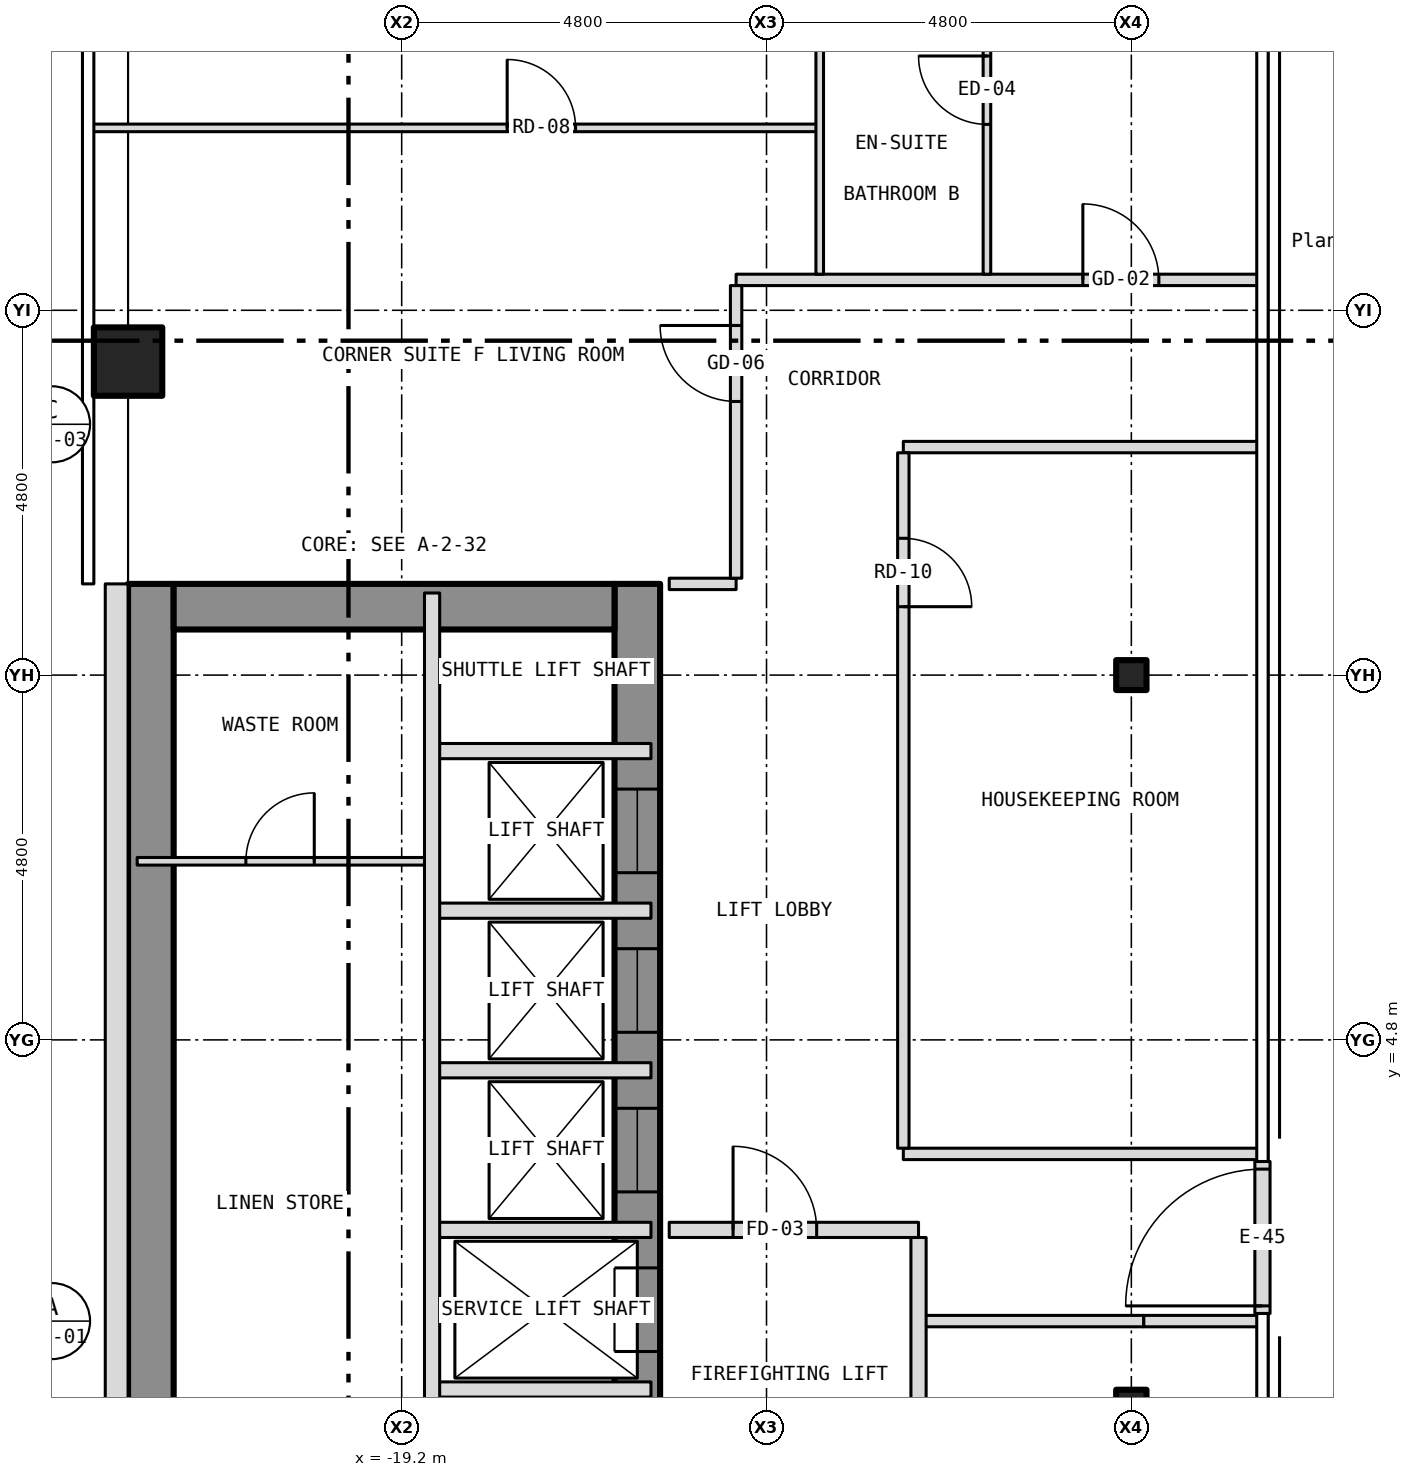
"""IFC4 building model, lengths in metres.
Left out: names, types, materials, properties, quantities, classifications, styles, units other than length and angle.
Written with IfcOpenShell. Run it as: python <this file> out.ifc"""

import sys

from ifc_helpers import new_model, si_unit, direction, frame, frame_2d, origin, origin_2d, place, context, subcontext, project, spatial, rectangle, hollow_rectangle, i_section, extrude, element, fill, save


model = new_model("IFC4")
c1 = context("Model", 3, precision=1e-05, world=origin(), true_north=direction((0.0, 1.0)))
c2 = subcontext(c1, "Body", "Model", "MODEL_VIEW")
j1 = project(units=[si_unit("LENGTHUNIT", "METRE"), si_unit("PLANEANGLEUNIT", "RADIAN")], contexts=[c1])
p1 = place(None, origin())
s1 = spatial("IfcSite", under=j1, at=p1, CompositionType="ELEMENT")
p2 = place(p1, origin())
s2 = spatial("IfcBuilding", under=s1, at=p2, CompositionType="ELEMENT")
p3 = place(p2, frame((0.0, 0.0, 117.0)))
s3 = spatial("IfcBuildingStorey", under=s2, at=p3, CompositionType="ELEMENT", Elevation=117.0)
p4 = place(p3, frame((-22.8, 13.725, -0.15), z_axis=(0.0, 0.0, 1.0), x_axis=(1.0, 0.0, 0.0)))
e1 = element("IfcColumn", 1, at=p4, inside=s3, PredefinedType="COLUMN", context=c2, shape_type="SweptSolid", body=[
    extrude(hollow_rectangle(XDim=0.9, YDim=0.9, WallThickness=0.05, at=origin_2d()), origin(), (0.0, 0.0, 1.0), 3.5),
])
for number, where, z_axis, x_axis in (
    (2, (-9.6, 0.0, -0.15), (0.0, 0.0, 1.0), (1.0, 0.0, 0.0)),
    (3, (-9.6, 9.6, -0.15), (0.0, 0.0, 1.0), (1.0, 0.0, 0.0)),
):
    element("IfcColumn", number, at=place(p3, frame(where, z_axis=z_axis, x_axis=x_axis)), inside=s3, PredefinedType="COLUMN", context=c2, shape_type="SweptSolid", body=[
        extrude(i_section(OverallWidth=0.399, OverallDepth=0.394, WebThickness=0.023, FlangeThickness=0.037, at=origin_2d()), origin(), (0.0, 0.0, 1.0), 3.5),
    ])
p5 = place(p3, frame((-16.1, -10.8, 0.0), z_axis=(0.0, 0.0, 1.0), x_axis=(0.0, 1.0, 0.0)))
e4 = element("IfcWall", 4, at=p5, inside=s3, PredefinedType="SHEAR", context=c2, shape_type="SweptSolid", body=[
    extrude(rectangle(XDim=21.6, YDim=0.6, at=frame_2d((10.8, 0.0))), origin(), (0.0, 0.0, 1.0), 3.25),
])
p6 = place(p5, frame((9.4, 0.0, 0.0)))
e5 = element("IfcOpeningElement", 5, at=p6, cuts=e4, PredefinedType="OPENING", context=c2, shape_type="SweptSolid", body=[
    extrude(rectangle(XDim=1.1, YDim=2.1, at=frame_2d((0.55, 1.05))), frame((0.0, 0.312, 0.0), z_axis=(0.0, -1.0, 0.0), x_axis=(1.0, 0.0, 0.0)), (0.0, 0.0, 1.0), 0.624),
])
p7 = place(p5, frame((11.5, 0.0, 0.0)))
e6 = element("IfcOpeningElement", 6, at=p7, cuts=e4, PredefinedType="OPENING", context=c2, shape_type="SweptSolid", body=[
    extrude(rectangle(XDim=1.1, YDim=2.1, at=frame_2d((0.55, 1.05))), frame((0.0, 0.312, 0.0), z_axis=(0.0, -1.0, 0.0), x_axis=(1.0, 0.0, 0.0)), (0.0, 0.0, 1.0), 0.624),
])
p8 = place(p5, frame((13.6, 0.0, 0.0)))
e7 = element("IfcOpeningElement", 7, at=p8, cuts=e4, PredefinedType="OPENING", context=c2, shape_type="SweptSolid", body=[
    extrude(rectangle(XDim=1.1, YDim=2.1, at=frame_2d((0.55, 1.05))), frame((0.0, 0.312, 0.0), z_axis=(0.0, -1.0, 0.0), x_axis=(1.0, 0.0, 0.0)), (0.0, 0.0, 1.0), 0.624),
])
p9 = place(p5, frame((15.7, 0.0, 0.0)))
e8 = element("IfcOpeningElement", 8, at=p9, cuts=e4, PredefinedType="OPENING", context=c2, shape_type="SweptSolid", body=[
    extrude(rectangle(XDim=1.1, YDim=2.1, at=frame_2d((0.55, 1.05))), frame((0.0, 0.312, 0.0), z_axis=(0.0, -1.0, 0.0), x_axis=(1.0, 0.0, 0.0)), (0.0, 0.0, 1.0), 0.624),
])
p10 = place(p5, frame((17.8, 0.0, 0.0)))
e9 = element("IfcOpeningElement", 9, at=p10, cuts=e4, PredefinedType="OPENING", context=c2, shape_type="SweptSolid", body=[
    extrude(rectangle(XDim=1.1, YDim=2.1, at=frame_2d((0.55, 1.05))), frame((0.0, 0.312, 0.0), z_axis=(0.0, -1.0, 0.0), x_axis=(1.0, 0.0, 0.0)), (0.0, 0.0, 1.0), 0.624),
])
p11 = place(p5, frame((0.758, 0.0, 0.0)))
e10 = element("IfcOpeningElement", 10, at=p11, cuts=e4, PredefinedType="OPENING", context=c2, shape_type="SweptSolid", body=[
    extrude(rectangle(XDim=1.1, YDim=2.1, at=frame_2d((0.55, 1.05))), frame((0.0, 0.312, 0.0), z_axis=(0.0, -1.0, 0.0), x_axis=(1.0, 0.0, 0.0)), (0.0, 0.0, 1.0), 0.624),
])
p12 = place(p5, frame((7.5, 0.0, 0.0)))
e11 = element("IfcOpeningElement", 11, at=p12, cuts=e4, PredefinedType="OPENING", context=c2, shape_type="SweptSolid", body=[
    extrude(rectangle(XDim=1.1, YDim=2.1, at=frame_2d((0.55, 1.05))), frame((0.0, 0.312, 0.0), z_axis=(0.0, -1.0, 0.0), x_axis=(1.0, 0.0, 0.0)), (0.0, 0.0, 1.0), 0.624),
])
p13 = place(p3, frame((-22.5, -10.8, 0.0), z_axis=(0.0, 0.0, 1.0), x_axis=(0.0, 1.0, 0.0)))
e12 = element("IfcWall", 12, at=p13, inside=s3, PredefinedType="SHEAR", context=c2, shape_type="SweptSolid", body=[
    extrude(rectangle(XDim=21.6, YDim=0.6, at=frame_2d((10.8, 0.0))), origin(), (0.0, 0.0, 1.0), 3.25),
])
p14 = place(p3, frame((-22.2, 10.5, 0.0), z_axis=(0.0, 0.0, 1.0), x_axis=(1.0, 0.0, 0.0)))
e13 = element("IfcWall", 13, at=p14, inside=s3, PredefinedType="SHEAR", context=c2, shape_type="SweptSolid", body=[
    extrude(rectangle(XDim=5.8, YDim=0.6, at=frame_2d((2.9, 0.0))), origin(), (0.0, 0.0, 1.0), 3.25),
])
p15 = place(p3, frame((-22.95, 10.8, 0.0), z_axis=(0.0, 0.0, 1.0), x_axis=(0.0, -1.0, 0.0)))
e14 = element("IfcWall", 14, at=p15, inside=s3, PredefinedType="SOLIDWALL", context=c2, shape_type="SweptSolid", body=[
    extrude(rectangle(XDim=21.6, YDim=0.3, at=frame_2d((10.8, 0.0))), origin(), (0.0, 0.0, 1.0), 3.5),
])
p16 = place(p15, frame((18.05, 0.0, 1.0)))
e15 = element("IfcOpeningElement", 15, at=p16, cuts=e14, PredefinedType="OPENING", context=c2, shape_type="SweptSolid", body=[
    extrude(rectangle(XDim=0.6, YDim=1.5, at=frame_2d((0.3, 0.75))), frame((0.0, 0.162, 0.0), z_axis=(0.0, -1.0, 0.0), x_axis=(1.0, 0.0, 0.0)), (0.0, 0.0, 1.0), 0.324),
])
p17 = place(p3, frame((-7.875, 1.2, 0.0), z_axis=(0.0, 0.0, 1.0), x_axis=(0.0, 1.0, 0.0)))
e16 = element("IfcWall", 16, at=p17, inside=s3, PredefinedType="SOLIDWALL", context=c2, shape_type="SweptSolid", body=[
    extrude(rectangle(XDim=2.0, YDim=0.2, at=frame_2d((1.0, 0.0))), origin(), (0.0, 0.0, 1.0), 2.593),
])
p18 = place(p17, frame((0.1, 0.0, 0.0)))
e17 = element("IfcOpeningElement", 17, at=p18, cuts=e16, PredefinedType="OPENING", context=c2, shape_type="SweptSolid", body=[
    extrude(rectangle(XDim=1.8, YDim=2.1, at=frame_2d((0.9, 1.05))), frame((0.0, 0.112, 0.0), z_axis=(0.0, -1.0, 0.0), x_axis=(1.0, 0.0, 0.0)), (0.0, 0.0, 1.0), 0.224),
])
p19 = place(p3, frame((-18.8, 0.2, 0.0), z_axis=(0.0, 0.0, 1.0), x_axis=(1.0, 0.0, 0.0)))
e18 = element("IfcWall", 18, at=p19, inside=s3, PredefinedType="PARTITIONING", context=c2, shape_type="SweptSolid", body=[
    extrude(rectangle(XDim=2.88, YDim=0.2, at=frame_2d((1.44, 0.0))), origin(), (0.0, 0.0, 1.0), 3.25),
])
p20 = place(p3, frame((-12.4, 1.1, 0.0), z_axis=(0.0, 0.0, 1.0), x_axis=(1.0, 0.0, 0.0)))
e19 = element("IfcWall", 19, at=p20, inside=s3, PredefinedType="PARTITIONING", context=c2, shape_type="SweptSolid", body=[
    extrude(rectangle(XDim=2.964, YDim=0.15, at=frame_2d((1.482, 0.0))), origin(), (0.0, 0.0, 1.0), 3.35),
])
p21 = place(p3, frame((-9.436, 1.1, 0.0), z_axis=(0.0, 0.0, 1.0), x_axis=(1.0, 0.0, 0.0)))
e20 = element("IfcWall", 20, at=p21, inside=s3, PredefinedType="PARTITIONING", context=c2, shape_type="SweptSolid", body=[
    extrude(rectangle(XDim=1.516, YDim=0.15, at=frame_2d((0.758, 0.0))), origin(), (0.0, 0.0, 1.0), 2.593),
])
p22 = place(p3, frame((-18.8, 2.3, 0.0), z_axis=(0.0, 0.0, 1.0), x_axis=(1.0, 0.0, 0.0)))
e21 = element("IfcWall", 21, at=p22, inside=s3, PredefinedType="PARTITIONING", context=c2, shape_type="SweptSolid", body=[
    extrude(rectangle(XDim=2.88, YDim=0.2, at=frame_2d((1.44, 0.0))), origin(), (0.0, 0.0, 1.0), 3.25),
])
p23 = place(p3, frame((-15.68, 2.3, 0.0), z_axis=(0.0, 0.0, 1.0), x_axis=(1.0, 0.0, 0.0)))
e22 = element("IfcWall", 22, at=p23, inside=s3, PredefinedType="PARTITIONING", context=c2, shape_type="SweptSolid", body=[
    extrude(rectangle(XDim=3.28, YDim=0.2, at=frame_2d((1.64, 0.0))), origin(), (0.0, 0.0, 1.0), 3.35),
])
p24 = place(p23, frame((0.84, 0.0, 0.0)))
e23 = element("IfcOpeningElement", 23, at=p24, cuts=e22, PredefinedType="OPENING", context=c2, shape_type="SweptSolid", body=[
    extrude(rectangle(XDim=1.1, YDim=2.1, at=frame_2d((0.55, 1.05))), frame((0.0, 0.112, 0.0), z_axis=(0.0, -1.0, 0.0), x_axis=(1.0, 0.0, 0.0)), (0.0, 0.0, 1.0), 0.224),
])
p25 = place(p3, frame((-12.6, 3.3, 0.0), z_axis=(0.0, 0.0, 1.0), x_axis=(1.0, 0.0, 0.0)))
e24 = element("IfcWall", 24, at=p25, inside=s3, PredefinedType="PARTITIONING", context=c2, shape_type="SweptSolid", body=[
    extrude(rectangle(XDim=4.68, YDim=0.15, at=frame_2d((2.34, 0.0))), origin(), (0.0, 0.0, 1.0), 3.35),
])
for number, where, z_axis, x_axis in (
    (25, (-18.8, 4.4, 0.0), (0.0, 0.0, 1.0), (1.0, 0.0, 0.0)),
    (26, (-18.8, 6.5, 0.0), (0.0, 0.0, 1.0), (1.0, 0.0, 0.0)),
):
    element("IfcWall", number, at=place(p3, frame(where, z_axis=z_axis, x_axis=x_axis)), inside=s3, PredefinedType="PARTITIONING", context=c2, shape_type="SweptSolid", body=[
        extrude(rectangle(XDim=2.88, YDim=0.2, at=frame_2d((1.44, 0.0))), origin(), (0.0, 0.0, 1.0), 3.25),
    ])
p26 = place(p3, frame((-22.68, 7.15, 0.0), z_axis=(0.0, 0.0, 1.0), x_axis=(1.0, 0.0, 0.0)))
e27 = element("IfcWall", 27, at=p26, inside=s3, PredefinedType="PARTITIONING", context=c2, shape_type="SweptSolid", body=[
    extrude(rectangle(XDim=3.88, YDim=0.1, at=frame_2d((1.94, 0.0))), origin(), (0.0, 0.0, 1.0), 3.25),
])
p27 = place(p26, frame((1.43, 0.0, 0.0)))
e28 = element("IfcOpeningElement", 28, at=p27, cuts=e27, PredefinedType="OPENING", context=c2, shape_type="SweptSolid", body=[
    extrude(rectangle(XDim=0.9, YDim=2.1, at=frame_2d((0.45, 1.05))), frame((0.0, 0.062, 0.0), z_axis=(0.0, -1.0, 0.0), x_axis=(1.0, 0.0, 0.0)), (0.0, 0.0, 1.0), 0.124),
])
p28 = place(p3, frame((-18.8, 8.6, 0.0), z_axis=(0.0, 0.0, 1.0), x_axis=(1.0, 0.0, 0.0)))
e29 = element("IfcWall", 29, at=p28, inside=s3, PredefinedType="PARTITIONING", context=c2, shape_type="SweptSolid", body=[
    extrude(rectangle(XDim=2.88, YDim=0.2, at=frame_2d((1.44, 0.0))), origin(), (0.0, 0.0, 1.0), 3.25),
])
p29 = place(p3, frame((-15.68, 10.8, 0.0), z_axis=(0.0, 0.0, 1.0), x_axis=(1.0, 0.0, 0.0)))
e30 = element("IfcWall", 30, at=p29, inside=s3, PredefinedType="PARTITIONING", context=c2, shape_type="SweptSolid", body=[
    extrude(rectangle(XDim=0.88, YDim=0.15, at=frame_2d((0.44, 0.0))), origin(), (0.0, 0.0, 1.0), 3.35),
])
p30 = place(p3, frame((-12.6, 12.6, 0.0), z_axis=(0.0, 0.0, 1.0), x_axis=(1.0, 0.0, 0.0)))
e31 = element("IfcWall", 31, at=p30, inside=s3, PredefinedType="PARTITIONING", context=c2, shape_type="SweptSolid", body=[
    extrude(rectangle(XDim=4.68, YDim=0.15, at=frame_2d((2.34, 0.0))), origin(), (0.0, 0.0, 1.0), 3.35),
])
p31 = place(p3, frame((-14.8, 14.8, 0.0), z_axis=(0.0, 0.0, 1.0), x_axis=(1.0, 0.0, 0.0)))
e32 = element("IfcWall", 32, at=p31, inside=s3, PredefinedType="PARTITIONING", context=c2, shape_type="SweptSolid", body=[
    extrude(rectangle(XDim=6.88, YDim=0.15, at=frame_2d((3.44, 0.0))), origin(), (0.0, 0.0, 1.0), 3.35),
])
p32 = place(p31, frame((4.562, 0.0, 0.0)))
e33 = element("IfcOpeningElement", 33, at=p32, cuts=e32, PredefinedType="OPENING", context=c2, shape_type="SweptSolid", body=[
    extrude(rectangle(XDim=1.0, YDim=2.1, at=frame_2d((0.5, 1.05))), frame((0.0, 0.087, 0.0), z_axis=(0.0, -1.0, 0.0), x_axis=(1.0, 0.0, 0.0)), (0.0, 0.0, 1.0), 0.174),
])
p33 = place(p3, frame((-23.28, 16.8, 0.0), z_axis=(0.0, 0.0, 1.0), x_axis=(1.0, 0.0, 0.0)))
e34 = element("IfcWall", 34, at=p33, inside=s3, PredefinedType="PARTITIONING", context=c2, shape_type="SweptSolid", body=[
    extrude(rectangle(XDim=9.58, YDim=0.1, at=frame_2d((4.79, 0.0))), origin(), (0.0, 0.0, 1.0), 3.35),
])
p34 = place(p33, frame((5.468, 0.0, 0.0)))
e35 = element("IfcOpeningElement", 35, at=p34, cuts=e34, PredefinedType="OPENING", context=c2, shape_type="SweptSolid", body=[
    extrude(rectangle(XDim=0.9, YDim=2.1, at=frame_2d((0.45, 1.05))), frame((0.0, 0.062, 0.0), z_axis=(0.0, -1.0, 0.0), x_axis=(1.0, 0.0, 0.0)), (0.0, 0.0, 1.0), 0.124),
])
p35 = place(p3, frame((-18.8, -1.8, 0.0), z_axis=(0.0, 0.0, 1.0), x_axis=(0.0, 1.0, 0.0)))
e36 = element("IfcWall", 36, at=p35, inside=s3, PredefinedType="PARTITIONING", context=c2, shape_type="SweptSolid", body=[
    extrude(rectangle(XDim=12.48, YDim=0.2, at=frame_2d((6.24, 0.0))), origin(), (0.0, 0.0, 1.0), 3.25),
])
p36 = place(p3, frame((-14.8, 10.875, 0.0), z_axis=(0.0, 0.0, 1.0), x_axis=(0.0, 1.0, 0.0)))
e37 = element("IfcWall", 37, at=p36, inside=s3, PredefinedType="PARTITIONING", context=c2, shape_type="SweptSolid", body=[
    extrude(rectangle(XDim=3.85, YDim=0.15, at=frame_2d((1.925, 0.0))), origin(), (0.0, 0.0, 1.0), 3.35),
])
p37 = place(p36, frame((2.325, 0.0, 0.0)))
e38 = element("IfcOpeningElement", 38, at=p37, cuts=e37, PredefinedType="OPENING", context=c2, shape_type="SweptSolid", body=[
    extrude(rectangle(XDim=1.0, YDim=2.1, at=frame_2d((0.5, 1.05))), frame((0.0, 0.087, 0.0), z_axis=(0.0, -1.0, 0.0), x_axis=(1.0, 0.0, 0.0)), (0.0, 0.0, 1.0), 0.174),
])
p38 = place(p3, frame((-13.7, 14.875, 0.0), z_axis=(0.0, 0.0, 1.0), x_axis=(0.0, 1.0, 0.0)))
e39 = element("IfcWall", 39, at=p38, inside=s3, PredefinedType="PARTITIONING", context=c2, shape_type="SweptSolid", body=[
    extrude(rectangle(XDim=7.805, YDim=0.1, at=frame_2d((3.902, 0.0))), origin(), (0.0, 0.0, 1.0), 3.35),
])
p39 = place(p3, frame((-12.6, 3.375, 0.0), z_axis=(0.0, 0.0, 1.0), x_axis=(0.0, 1.0, 0.0)))
e40 = element("IfcWall", 40, at=p39, inside=s3, PredefinedType="PARTITIONING", context=c2, shape_type="SweptSolid", body=[
    extrude(rectangle(XDim=9.15, YDim=0.15, at=frame_2d((4.575, 0.0))), origin(), (0.0, 0.0, 1.0), 3.35),
])
p40 = place(p39, frame((7.125, 0.0, 0.0)))
e41 = element("IfcOpeningElement", 41, at=p40, cuts=e40, PredefinedType="OPENING", context=c2, shape_type="SweptSolid", body=[
    extrude(rectangle(XDim=0.9, YDim=2.1, at=frame_2d((0.45, 1.05))), frame((0.0, 0.087, 0.0), z_axis=(0.0, -1.0, 0.0), x_axis=(1.0, 0.0, 0.0)), (0.0, 0.0, 1.0), 0.174),
])
p41 = place(p3, frame((-12.4, -1.8, 0.0), z_axis=(0.0, 0.0, 1.0), x_axis=(0.0, 1.0, 0.0)))
e42 = element("IfcWall", 42, at=p41, inside=s3, PredefinedType="PARTITIONING", context=c2, shape_type="SweptSolid", body=[
    extrude(rectangle(XDim=4.0, YDim=0.2, at=frame_2d((2.0, 0.0))), origin(), (0.0, 0.0, 1.0), 3.35),
])
p42 = place(p3, frame((-11.5, 14.875, 0.0), z_axis=(0.0, 0.0, 1.0), x_axis=(0.0, 1.0, 0.0)))
e43 = element("IfcWall", 43, at=p42, inside=s3, PredefinedType="PARTITIONING", context=c2, shape_type="SweptSolid", body=[
    extrude(rectangle(XDim=3.075, YDim=0.1, at=frame_2d((1.538, 0.0))), origin(), (0.0, 0.0, 1.0), 3.35),
])
p43 = place(p42, frame((1.971, 0.0, 0.0)))
e44 = element("IfcOpeningElement", 44, at=p43, cuts=e43, PredefinedType="OPENING", context=c2, shape_type="SweptSolid", body=[
    extrude(rectangle(XDim=0.9, YDim=2.1, at=frame_2d((0.45, 1.05))), frame((0.0, 0.062, 0.0), z_axis=(0.0, -1.0, 0.0), x_axis=(1.0, 0.0, 0.0)), (0.0, 0.0, 1.0), 0.124),
])
p44 = place(p18, origin())
e45 = element("IfcDoor", 45, at=p44, inside=s3, OperationType="DOUBLE_DOOR_DOUBLE_SWING", PredefinedType="DOOR", context=c2, shape_type="SweptSolid", body=[
    extrude(rectangle(XDim=1.8, YDim=2.1, at=frame_2d((0.9, 1.05))), frame((0.0, 0.025, 0.0), z_axis=(0.0, -1.0, 0.0), x_axis=(1.0, 0.0, 0.0)), (0.0, 0.0, 1.0), 0.05),
])
fill(e17, e45)
p45 = place(p7, origin())
e46 = element("IfcDoor", 46, at=p45, inside=s3, OperationType="SLIDING_TO_LEFT", PredefinedType="DOOR", context=c2, shape_type="SweptSolid", body=[
    extrude(rectangle(XDim=1.1, YDim=2.1, at=frame_2d((0.55, 1.05))), frame((0.0, 0.025, 0.0), z_axis=(0.0, -1.0, 0.0), x_axis=(1.0, 0.0, 0.0)), (0.0, 0.0, 1.0), 0.05),
])
fill(e6, e46)
p46 = place(p8, origin())
e47 = element("IfcDoor", 47, at=p46, inside=s3, OperationType="SLIDING_TO_LEFT", PredefinedType="DOOR", context=c2, shape_type="SweptSolid", body=[
    extrude(rectangle(XDim=1.1, YDim=2.1, at=frame_2d((0.55, 1.05))), frame((0.0, 0.025, 0.0), z_axis=(0.0, -1.0, 0.0), x_axis=(1.0, 0.0, 0.0)), (0.0, 0.0, 1.0), 0.05),
])
fill(e7, e47)
p47 = place(p9, origin())
e48 = element("IfcDoor", 48, at=p47, inside=s3, OperationType="SLIDING_TO_LEFT", PredefinedType="DOOR", context=c2, shape_type="SweptSolid", body=[
    extrude(rectangle(XDim=1.1, YDim=2.1, at=frame_2d((0.55, 1.05))), frame((0.0, 0.025, 0.0), z_axis=(0.0, -1.0, 0.0), x_axis=(1.0, 0.0, 0.0)), (0.0, 0.0, 1.0), 0.05),
])
fill(e8, e48)
p48 = place(p10, origin())
e49 = element("IfcDoor", 49, at=p48, inside=s3, OperationType="SLIDING_TO_LEFT", PredefinedType="DOOR", context=c2, shape_type="SweptSolid", body=[
    extrude(rectangle(XDim=1.1, YDim=2.1, at=frame_2d((0.55, 1.05))), frame((0.0, 0.025, 0.0), z_axis=(0.0, -1.0, 0.0), x_axis=(1.0, 0.0, 0.0)), (0.0, 0.0, 1.0), 0.05),
])
fill(e9, e49)
p49 = place(p27, origin())
e50 = element("IfcDoor", 50, at=p49, inside=s3, OperationType="SINGLE_SWING_RIGHT", PredefinedType="DOOR", context=c2, shape_type="SweptSolid", body=[
    extrude(rectangle(XDim=0.9, YDim=2.1, at=frame_2d((0.45, 1.05))), frame((0.0, 0.025, 0.0), z_axis=(0.0, -1.0, 0.0), x_axis=(1.0, 0.0, 0.0)), (0.0, 0.0, 1.0), 0.05),
])
fill(e28, e50)
p50 = place(p24, origin())
e51 = element("IfcDoor", 51, at=p50, inside=s3, OperationType="SINGLE_SWING_LEFT", PredefinedType="DOOR", context=c2, shape_type="SweptSolid", body=[
    extrude(rectangle(XDim=1.1, YDim=2.1, at=frame_2d((0.55, 1.05))), frame((0.0, 0.025, 0.0), z_axis=(0.0, -1.0, 0.0), x_axis=(1.0, 0.0, 0.0)), (0.0, 0.0, 1.0), 0.05),
])
fill(e23, e51)
p51 = place(p32, origin())
e52 = element("IfcDoor", 52, at=p51, inside=s3, OperationType="SINGLE_SWING_LEFT", PredefinedType="DOOR", context=c2, shape_type="SweptSolid", body=[
    extrude(rectangle(XDim=1.0, YDim=2.1, at=frame_2d((0.5, 1.05))), frame((0.0, 0.025, 0.0), z_axis=(0.0, -1.0, 0.0), x_axis=(1.0, 0.0, 0.0)), (0.0, 0.0, 1.0), 0.05),
])
fill(e33, e52)
p52 = place(p43, origin())
e53 = element("IfcDoor", 53, at=p52, inside=s3, OperationType="SINGLE_SWING_RIGHT", PredefinedType="DOOR", context=c2, shape_type="SweptSolid", body=[
    extrude(rectangle(XDim=0.9, YDim=2.1, at=frame_2d((0.45, 1.05))), frame((0.0, 0.025, 0.0), z_axis=(0.0, -1.0, 0.0), x_axis=(1.0, 0.0, 0.0)), (0.0, 0.0, 1.0), 0.05),
])
fill(e44, e53)
p53 = place(p37, origin())
e54 = element("IfcDoor", 54, at=p53, inside=s3, OperationType="SINGLE_SWING_RIGHT", PredefinedType="DOOR", context=c2, shape_type="SweptSolid", body=[
    extrude(rectangle(XDim=1.0, YDim=2.1, at=frame_2d((0.5, 1.05))), frame((0.0, 0.025, 0.0), z_axis=(0.0, -1.0, 0.0), x_axis=(1.0, 0.0, 0.0)), (0.0, 0.0, 1.0), 0.05),
])
fill(e38, e54)
p54 = place(p34, origin())
e55 = element("IfcDoor", 55, at=p54, inside=s3, OperationType="SINGLE_SWING_LEFT", PredefinedType="DOOR", context=c2, shape_type="SweptSolid", body=[
    extrude(rectangle(XDim=0.9, YDim=2.1, at=frame_2d((0.45, 1.05))), frame((0.0, 0.025, 0.0), z_axis=(0.0, -1.0, 0.0), x_axis=(1.0, 0.0, 0.0)), (0.0, 0.0, 1.0), 0.05),
])
fill(e35, e55)
p55 = place(p40, origin())
e56 = element("IfcDoor", 56, at=p55, inside=s3, OperationType="SINGLE_SWING_LEFT", PredefinedType="DOOR", context=c2, shape_type="SweptSolid", body=[
    extrude(rectangle(XDim=0.9, YDim=2.1, at=frame_2d((0.45, 1.05))), frame((0.0, 0.025, 0.0), z_axis=(0.0, -1.0, 0.0), x_axis=(1.0, 0.0, 0.0)), (0.0, 0.0, 1.0), 0.05),
])
fill(e41, e56)
save(model, sys.argv[1])
